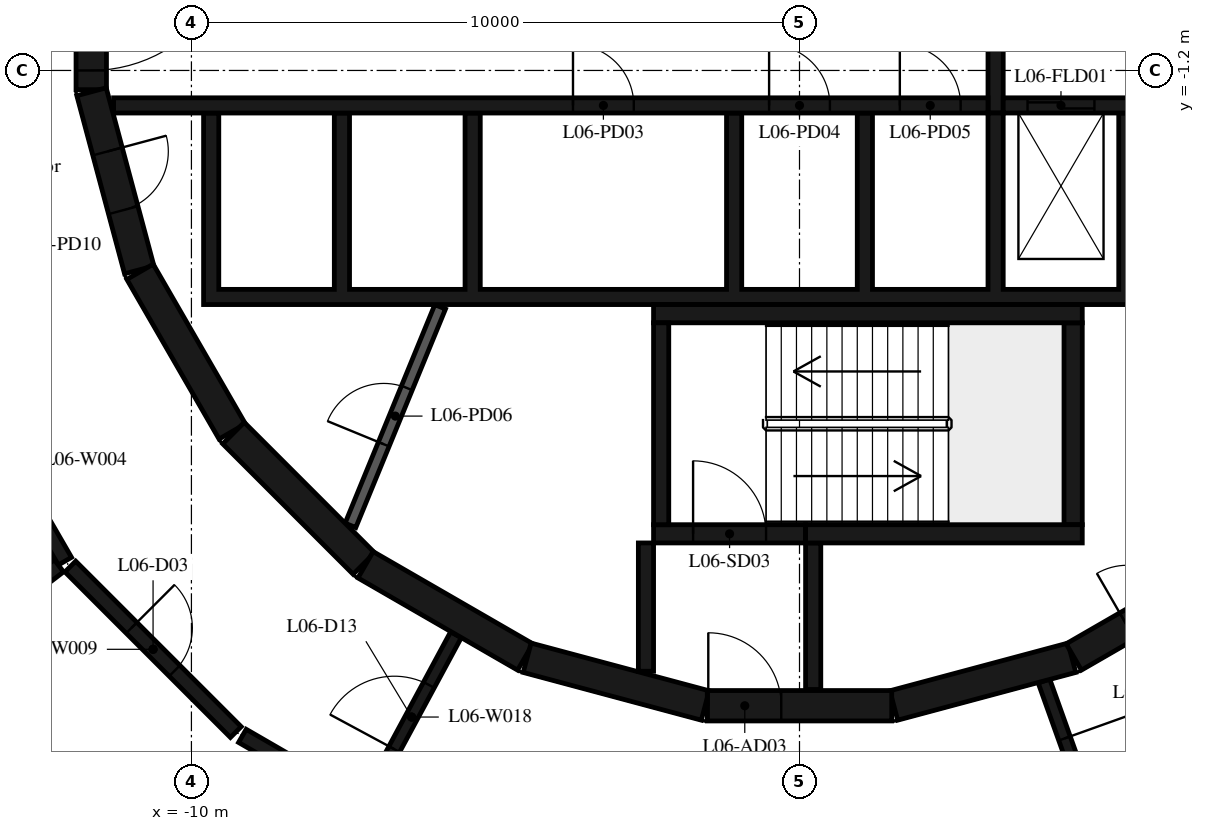
"""IFC4 building model, lengths in metres.
Left out: names, types, materials, properties, quantities, classifications, styles, units other than length and angle.
Written with IfcOpenShell. Run it as: python <this file> out.ifc"""

import sys

from ifc_helpers import new_model, si_unit, direction, frame, frame_2d, origin, place, context, subcontext, project, spatial, polyline, rectangle, outline, extrude, element, fill, save


model = new_model("IFC4")
c1 = context("Model", 3, precision=1e-05, world=origin(), true_north=direction((0.0, 1.0)))
c2 = subcontext(c1, "Body", "Model", "MODEL_VIEW")
j1 = project(units=[si_unit("LENGTHUNIT", "METRE"), si_unit("PLANEANGLEUNIT", "RADIAN")], contexts=[c1])
p1 = place(None, origin())
s1 = spatial("IfcSite", under=j1, at=p1, CompositionType="ELEMENT")
p2 = place(p1, origin())
s2 = spatial("IfcBuilding", under=s1, at=p2, CompositionType="ELEMENT")
p3 = place(p2, frame((0.0, 0.0, 33.0)))
s3 = spatial("IfcBuildingStorey", under=s2, at=p3, CompositionType="ELEMENT", Elevation=33.0)
p4 = place(p3, frame((1.55, -11.643, 0.0), z_axis=(0.0, 0.0, 1.0), x_axis=(0.965948410781, 0.258734743916, 0.0)))
e1 = element("IfcWall", 1, at=p4, inside=s3, PredefinedType="SHEAR", context=c2, shape_type="SweptSolid", body=[
    extrude(rectangle(XDim=3.033, YDim=0.5, at=frame_2d((1.516, 0.0))), origin(), (0.0, 0.0, 1.0), 4.95),
])
p5 = place(p3, frame((4.51, -10.845, 0.0), z_axis=(0.0, 0.0, 1.0), x_axis=(0.865975092491, 0.500087131594, 0.0)))
e2 = element("IfcWall", 2, at=p5, inside=s3, PredefinedType="SHEAR", context=c2, shape_type="SweptSolid", body=[
    extrude(rectangle(XDim=3.033, YDim=0.5, at=frame_2d((1.516, 0.0))), origin(), (0.0, 0.0, 1.0), 4.95),
])
p6 = place(p5, frame((1.016, 0.0, 0.0)))
e3 = element("IfcOpeningElement", 3, at=p6, cuts=e2, PredefinedType="OPENING", context=c2, shape_type="SweptSolid", body=[
    extrude(rectangle(XDim=1.0, YDim=2.4, at=frame_2d((0.5, 1.2))), frame((0.0, 0.26, 0.0), z_axis=(0.0, -1.0, 0.0), x_axis=(1.0, 0.0, 0.0)), (0.0, 0.0, 1.0), 0.52),
])
p7 = place(p3, frame((-11.647, 1.516, 0.0), z_axis=(0.0, 0.0, 1.0), x_axis=(0.0, -1.0, 0.0)))
e4 = element("IfcWall", 4, at=p7, inside=s3, PredefinedType="SHEAR", context=c2, shape_type="SweptSolid", body=[
    extrude(rectangle(XDim=3.033, YDim=0.5, at=frame_2d((1.516, 0.0))), origin(), (0.0, 0.0, 1.0), 4.95),
])
p8 = place(p7, frame((0.316, 0.0, 0.0)))
e5 = element("IfcOpeningElement", 5, at=p8, cuts=e4, PredefinedType="OPENING", context=c2, shape_type="SweptSolid", body=[
    extrude(rectangle(XDim=2.4, YDim=2.1, at=frame_2d((1.2, 1.05))), frame((0.0, 0.26, 0.0), z_axis=(0.0, -1.0, 0.0), x_axis=(1.0, 0.0, 0.0)), (0.0, 0.0, 1.0), 0.52),
])
p9 = place(p3, frame((-11.643, -1.55, 0.0), z_axis=(0.0, 0.0, 1.0), x_axis=(0.258734743916, -0.965948410781, 0.0)))
e6 = element("IfcWall", 6, at=p9, inside=s3, PredefinedType="SHEAR", context=c2, shape_type="SweptSolid", body=[
    extrude(rectangle(XDim=3.033, YDim=0.5, at=frame_2d((1.516, 0.0))), origin(), (0.0, 0.0, 1.0), 4.95),
])
p10 = place(p9, frame((1.016, 0.0, 0.0)))
e7 = element("IfcOpeningElement", 7, at=p10, cuts=e6, PredefinedType="OPENING", context=c2, shape_type="SweptSolid", body=[
    extrude(rectangle(XDim=1.0, YDim=2.4, at=frame_2d((0.5, 1.2))), frame((0.0, 0.26, 0.0), z_axis=(0.0, -1.0, 0.0), x_axis=(1.0, 0.0, 0.0)), (0.0, 0.0, 1.0), 0.52),
])
p11 = place(p3, frame((-10.845, -4.51, 0.0), z_axis=(0.0, 0.0, 1.0), x_axis=(0.500087131594, -0.865975092491, 0.0)))
e8 = element("IfcWall", 8, at=p11, inside=s3, PredefinedType="SHEAR", context=c2, shape_type="SweptSolid", body=[
    extrude(rectangle(XDim=3.033, YDim=0.5, at=frame_2d((1.516, 0.0))), origin(), (0.0, 0.0, 1.0), 4.95),
])
p12 = place(p3, frame((-9.308, -7.164, 0.0), z_axis=(0.0, 0.0, 1.0), x_axis=(0.707106781187, -0.707106781187, 0.0)))
e9 = element("IfcWall", 9, at=p12, inside=s3, PredefinedType="SHEAR", context=c2, shape_type="SweptSolid", body=[
    extrude(rectangle(XDim=3.032, YDim=0.5, at=frame_2d((1.516, 0.0))), origin(), (0.0, 0.0, 1.0), 4.95),
])
for number, where, z_axis, x_axis in (
    (10, (-7.137, -9.329, 0.0), (0.0, 0.0, 1.0), (0.866, -0.5, 0.0)),
    (11, (-4.479, -10.858, 0.0), (0.0, 0.0, 1.0), (0.966, -0.259, 0.0)),
):
    element("IfcWall", number, at=place(p3, frame(where, z_axis=z_axis, x_axis=x_axis)), inside=s3, PredefinedType="SHEAR", context=c2, shape_type="SweptSolid", body=[
        extrude(rectangle(XDim=3.033, YDim=0.5, at=frame_2d((1.516, 0.0))), origin(), (0.0, 0.0, 1.0), 4.95),
    ])
p13 = place(p3, frame((-1.516, -11.647, 0.0), z_axis=(0.0, 0.0, 1.0), x_axis=(1.0, 0.0, 0.0)))
e12 = element("IfcWall", 12, at=p13, inside=s3, PredefinedType="SHEAR", context=c2, shape_type="SweptSolid", body=[
    extrude(rectangle(XDim=3.033, YDim=0.5, at=frame_2d((1.516, 0.0))), origin(), (0.0, 0.0, 1.0), 4.95),
])
p14 = place(p13, frame((0.016, 0.0, 0.0)))
e13 = element("IfcOpeningElement", 13, at=p14, cuts=e12, PredefinedType="OPENING", context=c2, shape_type="SweptSolid", body=[
    extrude(rectangle(XDim=1.2, YDim=2.1, at=frame_2d((0.6, 1.05))), frame((0.0, 0.26, 0.0), z_axis=(0.0, -1.0, 0.0), x_axis=(1.0, 0.0, 0.0)), (0.0, 0.0, 1.0), 0.52),
])
p15 = place(p3, frame((-2.275, -8.67, 0.0), z_axis=(0.0, 0.0, 1.0), x_axis=(0.0, 1.0, 0.0)))
e14 = element("IfcWall", 14, at=p15, inside=s3, PredefinedType="SHEAR", context=c2, shape_type="SweptSolid", body=[
    extrude(rectangle(XDim=3.32, YDim=0.25, at=frame_2d((1.66, 0.0))), origin(), (0.0, 0.0, 1.0), 4.95),
])
p16 = place(p3, frame((-2.4, -5.2, 0.0), z_axis=(0.0, 0.0, 1.0), x_axis=(1.0, 0.0, 0.0)))
e15 = element("IfcWall", 15, at=p16, inside=s3, PredefinedType="SHEAR", context=c2, shape_type="SweptSolid", body=[
    extrude(rectangle(XDim=7.05, YDim=0.3, at=frame_2d((3.525, 0.0))), origin(), (0.0, 0.0, 1.0), 4.95),
])
p17 = place(p3, frame((4.5, -8.67, 0.0), z_axis=(0.0, 0.0, 1.0), x_axis=(0.0, 1.0, 0.0)))
e16 = element("IfcWall", 16, at=p17, inside=s3, PredefinedType="SHEAR", context=c2, shape_type="SweptSolid", body=[
    extrude(rectangle(XDim=3.32, YDim=0.3, at=frame_2d((1.66, 0.0))), origin(), (0.0, 0.0, 1.0), 4.95),
])
p18 = place(p3, frame((0.1, -8.82, 0.0), z_axis=(0.0, 0.0, 1.0), x_axis=(1.0, 0.0, 0.0)))
e17 = element("IfcWall", 17, at=p18, inside=s3, PredefinedType="SHEAR", context=c2, shape_type="SweptSolid", body=[
    extrude(rectangle(XDim=4.55, YDim=0.3, at=frame_2d((2.275, 0.0))), origin(), (0.0, 0.0, 1.0), 4.95),
])
p19 = place(p3, frame((-2.4, -8.82, 0.0), z_axis=(0.0, 0.0, 1.0), x_axis=(1.0, 0.0, 0.0)))
e18 = element("IfcWall", 18, at=p19, inside=s3, PredefinedType="SHEAR", context=c2, shape_type="SweptSolid", body=[
    extrude(rectangle(XDim=2.5, YDim=0.3, at=frame_2d((1.25, 0.0))), origin(), (0.0, 0.0, 1.0), 4.95),
])
p20 = place(p19, frame((0.65, 0.0, 0.0)))
e19 = element("IfcOpeningElement", 19, at=p20, cuts=e18, PredefinedType="OPENING", context=c2, shape_type="SweptSolid", body=[
    extrude(rectangle(XDim=1.2, YDim=2.1, at=frame_2d((0.6, 1.05))), frame((0.0, 0.16, 0.0), z_axis=(0.0, -1.0, 0.0), x_axis=(1.0, 0.0, 0.0)), (0.0, 0.0, 1.0), 0.32),
])
p21 = place(p3, frame((-2.525, -8.97, 0.0), z_axis=(0.0, 0.0, 1.0), x_axis=(0.0, -1.0, 0.0)))
e20 = element("IfcWall", 20, at=p21, inside=s3, PredefinedType="SHEAR", context=c2, shape_type="SweptSolid", body=[
    extrude(rectangle(XDim=2.11, YDim=0.25, at=frame_2d((1.055, 0.0))), origin(), (0.0, 0.0, 1.0), 4.95),
])
p22 = place(p3, frame((0.225, -8.97, 0.0), z_axis=(0.0, 0.0, 1.0), x_axis=(0.0, -1.0, 0.0)))
e21 = element("IfcWall", 21, at=p22, inside=s3, PredefinedType="SHEAR", context=c2, shape_type="SweptSolid", body=[
    extrude(rectangle(XDim=2.41, YDim=0.25, at=frame_2d((1.205, 0.0))), origin(), (0.0, 0.0, 1.0), 4.95),
])
p23 = place(p3, origin())
e22 = element("IfcWall", 22, at=p23, inside=s3, PredefinedType="SHEAR", context=c2, shape_type="SweptSolid", body=[
    extrude(outline(polyline([(9.8, -5.05), (9.8, -4.8), (9.8, -1.9), (9.55, -1.9), (9.55, -4.8), (7.65, -4.8), (7.65, -1.9), (7.4, -1.9), (7.4, -4.8), (5.5, -4.8), (5.5, -1.9), (5.25, -1.9), (5.25, -4.8), (3.35, -4.8), (3.35, -1.9), (3.1, -1.9), (3.1, -4.8), (1.2, -4.8), (1.2, -1.9), (0.95, -1.9), (0.95, -4.8), (-0.95, -4.8), (-0.95, -1.9), (-1.2, -1.9), (-1.2, -4.8), (-5.25, -4.8), (-5.25, -1.9), (-5.5, -1.9), (-5.5, -4.8), (-7.4, -4.8), (-7.4, -1.9), (-7.65, -1.9), (-7.65, -4.8), (-9.55, -4.8), (-9.55, -1.9), (-9.8, -1.9), (-9.8, -4.8), (-9.8, -5.05), (9.8, -5.05)])), origin(), (0.0, 0.0, 1.0), 4.95),
])
p24 = place(p3, frame((-11.28, -1.775, 0.0), z_axis=(0.0, 0.0, 1.0), x_axis=(1.0, 0.0, 0.0)))
e23 = element("IfcWall", 23, at=p24, inside=s3, PredefinedType="SHEAR", context=c2, shape_type="SweptSolid", body=[
    extrude(rectangle(XDim=14.38, YDim=0.25, at=frame_2d((7.19, 0.0))), origin(), (0.0, 0.0, 1.0), 4.95),
])
p25 = place(p24, frame((7.555, 0.0, 0.0)))
e24 = element("IfcOpeningElement", 24, at=p25, cuts=e23, PredefinedType="OPENING", context=c2, shape_type="SweptSolid", body=[
    extrude(rectangle(XDim=1.0, YDim=2.4, at=frame_2d((0.5, 1.2))), frame((0.0, 0.135, 0.0), z_axis=(0.0, -1.0, 0.0), x_axis=(1.0, 0.0, 0.0)), (0.0, 0.0, 1.0), 0.27),
])
p26 = place(p24, frame((10.78, 0.0, 0.0)))
e25 = element("IfcOpeningElement", 25, at=p26, cuts=e23, PredefinedType="OPENING", context=c2, shape_type="SweptSolid", body=[
    extrude(rectangle(XDim=1.0, YDim=2.4, at=frame_2d((0.5, 1.2))), frame((0.0, 0.135, 0.0), z_axis=(0.0, -1.0, 0.0), x_axis=(1.0, 0.0, 0.0)), (0.0, 0.0, 1.0), 0.27),
])
p27 = place(p24, frame((12.93, 0.0, 0.0)))
e26 = element("IfcOpeningElement", 26, at=p27, cuts=e23, PredefinedType="OPENING", context=c2, shape_type="SweptSolid", body=[
    extrude(rectangle(XDim=1.0, YDim=2.4, at=frame_2d((0.5, 1.2))), frame((0.0, 0.135, 0.0), z_axis=(0.0, -1.0, 0.0), x_axis=(1.0, 0.0, 0.0)), (0.0, 0.0, 1.0), 0.27),
])
p28 = place(p3, frame((3.35, -1.775, 0.0), z_axis=(0.0, 0.0, 1.0), x_axis=(1.0, 0.0, 0.0)))
e27 = element("IfcWall", 27, at=p28, inside=s3, PredefinedType="SHEAR", context=c2, shape_type="SweptSolid", body=[
    extrude(rectangle(XDim=7.93, YDim=0.25, at=frame_2d((3.965, 0.0))), origin(), (0.0, 0.0, 1.0), 4.95),
])
p29 = place(p28, frame((0.4, 0.0, 0.0)))
e28 = element("IfcOpeningElement", 28, at=p29, cuts=e27, PredefinedType="OPENING", context=c2, shape_type="SweptSolid", body=[
    extrude(rectangle(XDim=1.1, YDim=2.4, at=frame_2d((0.55, 1.2))), frame((0.0, 0.135, 0.0), z_axis=(0.0, -1.0, 0.0), x_axis=(1.0, 0.0, 0.0)), (0.0, 0.0, 1.0), 0.27),
])
p30 = place(p28, frame((2.55, 0.0, 0.0)))
e29 = element("IfcOpeningElement", 29, at=p30, cuts=e27, PredefinedType="OPENING", context=c2, shape_type="SweptSolid", body=[
    extrude(rectangle(XDim=1.1, YDim=2.4, at=frame_2d((0.55, 1.2))), frame((0.0, 0.135, 0.0), z_axis=(0.0, -1.0, 0.0), x_axis=(1.0, 0.0, 0.0)), (0.0, 0.0, 1.0), 0.27),
])
p31 = place(p28, frame((4.7, 0.0, 0.0)))
e30 = element("IfcOpeningElement", 30, at=p31, cuts=e27, PredefinedType="OPENING", context=c2, shape_type="SweptSolid", body=[
    extrude(rectangle(XDim=1.1, YDim=2.4, at=frame_2d((0.55, 1.2))), frame((0.0, 0.135, 0.0), z_axis=(0.0, -1.0, 0.0), x_axis=(1.0, 0.0, 0.0)), (0.0, 0.0, 1.0), 0.27),
])
p32 = place(p3, frame((3.225, -1.9, 0.0), z_axis=(0.0, 0.0, 1.0), x_axis=(0.0, 1.0, 0.0)))
e31 = element("IfcWall", 31, at=p32, inside=s3, PredefinedType="SHEAR", context=c2, shape_type="SweptSolid", body=[
    extrude(rectangle(XDim=3.8, YDim=0.25, at=frame_2d((1.9, 0.0))), origin(), (0.0, 0.0, 1.0), 4.95),
])
p33 = place(p3, frame((-7.385, -8.681, 0.0), z_axis=(0.0, 0.0, 1.0), x_axis=(0.379804590409, 0.925066739811, 0.0)))
e32 = element("IfcWall", 32, at=p33, inside=s3, PredefinedType="PARTITIONING", context=c2, shape_type="SweptSolid", body=[
    extrude(rectangle(XDim=3.885, YDim=0.19, at=frame_2d((1.942, 0.0))), origin(), (0.0, 0.0, 1.0), 4.95),
])
p34 = place(p33, frame((1.443, 0.0, 0.0)))
e33 = element("IfcOpeningElement", 33, at=p34, cuts=e32, PredefinedType="OPENING", context=c2, shape_type="SweptSolid", body=[
    extrude(rectangle(XDim=1.0, YDim=2.4, at=frame_2d((0.5, 1.2))), frame((0.0, 0.105, 0.0), z_axis=(0.0, -1.0, 0.0), x_axis=(1.0, 0.0, 0.0)), (0.0, 0.0, 1.0), 0.21),
])
p35 = place(p3, frame((-14.007, -5.938, 0.0), z_axis=(0.0, 0.0, 1.0), x_axis=(0.500708693508, -0.865615852585, 0.0)))
e34 = element("IfcWall", 34, at=p35, inside=s3, PredefinedType="PARTITIONING", context=c2, shape_type="SweptSolid", body=[
    extrude(rectangle(XDim=3.849, YDim=0.25, at=frame_2d((1.925, 0.0))), origin(), (0.0, 0.0, 1.0), 4.95),
])
p36 = place(p3, frame((-12.179, -9.346, 0.0), z_axis=(0.0, 0.0, 1.0), x_axis=(-0.793242531183, -0.608905811043, 0.0)))
e35 = element("IfcWall", 35, at=p36, inside=s3, PredefinedType="PARTITIONING", context=c2, shape_type="SweptSolid", body=[
    extrude(rectangle(XDim=14.986, YDim=0.25, at=frame_2d((7.493, 0.0))), origin(), (0.0, 0.0, 1.0), 4.95),
])
p37 = place(p3, frame((-11.992, -9.358, 0.0), z_axis=(0.0, 0.0, 1.0), x_axis=(0.707106781187, -0.707106781187, 0.0)))
e36 = element("IfcWall", 36, at=p37, inside=s3, PredefinedType="PARTITIONING", context=c2, shape_type="SweptSolid", body=[
    extrude(rectangle(XDim=3.849, YDim=0.25, at=frame_2d((1.925, 0.0))), origin(), (0.0, 0.0, 1.0), 4.95),
])
p38 = place(p37, frame((1.425, 0.0, 0.0)))
e37 = element("IfcOpeningElement", 37, at=p38, cuts=e36, PredefinedType="OPENING", context=c2, shape_type="SweptSolid", body=[
    extrude(rectangle(XDim=1.0, YDim=2.1, at=frame_2d((0.5, 1.05))), frame((0.0, 0.135, 0.0), z_axis=(0.0, -1.0, 0.0), x_axis=(1.0, 0.0, 0.0)), (0.0, 0.0, 1.0), 0.27),
])
p39 = place(p3, frame((-9.162, -12.143, 0.0), z_axis=(0.0, 0.0, 1.0), x_axis=(0.865576208327, -0.500777223502, 0.0)))
e38 = element("IfcWall", 38, at=p39, inside=s3, PredefinedType="PARTITIONING", context=c2, shape_type="SweptSolid", body=[
    extrude(rectangle(XDim=2.303, YDim=0.25, at=frame_2d((1.152, 0.0))), origin(), (0.0, 0.0, 1.0), 4.95),
])
p40 = place(p3, frame((-7.109, -13.186, 0.0), z_axis=(0.0, 0.0, 1.0), x_axis=(0.474511788195, 0.880249148176, 0.0)))
e39 = element("IfcWall", 39, at=p40, inside=s3, PredefinedType="PARTITIONING", context=c2, shape_type="SweptSolid", body=[
    extrude(rectangle(XDim=3.074, YDim=0.2, at=frame_2d((1.537, 0.0))), origin(), (0.0, 0.0, 1.0), 4.95),
])
p41 = place(p40, frame((0.937, 0.0, 0.0)))
e40 = element("IfcOpeningElement", 40, at=p41, cuts=e39, PredefinedType="OPENING", context=c2, shape_type="SweptSolid", body=[
    extrude(rectangle(XDim=1.2, YDim=2.1, at=frame_2d((0.6, 1.05))), frame((0.0, 0.11, 0.0), z_axis=(0.0, -1.0, 0.0), x_axis=(1.0, 0.0, 0.0)), (0.0, 0.0, 1.0), 0.22),
])
p42 = place(p3, frame((4.02, -11.24, 0.0), z_axis=(0.0, 0.0, 1.0), x_axis=(0.336751058688, -0.941593715183, 0.0)))
e41 = element("IfcWall", 41, at=p42, inside=s3, PredefinedType="PARTITIONING", context=c2, shape_type="SweptSolid", body=[
    extrude(rectangle(XDim=3.207, YDim=0.2, at=frame_2d((1.604, 0.0))), origin(), (0.0, 0.0, 1.0), 4.95),
])
p43 = place(p42, frame((1.004, 0.0, 0.0)))
e42 = element("IfcOpeningElement", 42, at=p43, cuts=e41, PredefinedType="OPENING", context=c2, shape_type="SweptSolid", body=[
    extrude(rectangle(XDim=1.2, YDim=2.1, at=frame_2d((0.6, 1.05))), frame((0.0, 0.11, 0.0), z_axis=(0.0, -1.0, 0.0), x_axis=(1.0, 0.0, 0.0)), (0.0, 0.0, 1.0), 0.22),
])
p44 = place(p20, origin())
e43 = element("IfcDoor", 43, at=p44, inside=s3, OperationType="SINGLE_SWING_LEFT", PredefinedType="DOOR", context=c2, shape_type="SweptSolid", body=[
    extrude(rectangle(XDim=1.2, YDim=2.1, at=frame_2d((0.6, 1.05))), frame((0.0, 0.025, 0.0), z_axis=(0.0, -1.0, 0.0), x_axis=(1.0, 0.0, 0.0)), (0.0, 0.0, 1.0), 0.05),
])
fill(e19, e43)
p45 = place(p14, origin())
e44 = element("IfcDoor", 44, at=p45, inside=s3, OperationType="SINGLE_SWING_RIGHT", PredefinedType="DOOR", context=c2, shape_type="SweptSolid", body=[
    extrude(rectangle(XDim=1.2, YDim=2.1, at=frame_2d((0.6, 1.05))), frame((0.0, 0.025, 0.0), z_axis=(0.0, -1.0, 0.0), x_axis=(1.0, 0.0, 0.0)), (0.0, 0.0, 1.0), 0.05),
])
fill(e13, e44)
p46 = place(p8, origin())
e45 = element("IfcDoor", 45, at=p46, inside=s3, OperationType="DOUBLE_DOOR_SINGLE_SWING", PredefinedType="DOOR", context=c2, shape_type="SweptSolid", body=[
    extrude(rectangle(XDim=2.4, YDim=2.1, at=frame_2d((1.2, 1.05))), frame((0.0, 0.025, 0.0), z_axis=(0.0, -1.0, 0.0), x_axis=(1.0, 0.0, 0.0)), (0.0, 0.0, 1.0), 0.05),
])
fill(e5, e45)
p47 = place(p29, origin())
e46 = element("IfcDoor", 46, at=p47, inside=s3, OperationType="DOUBLE_DOOR_SLIDING", PredefinedType="DOOR", context=c2, shape_type="SweptSolid", body=[
    extrude(rectangle(XDim=1.1, YDim=2.4, at=frame_2d((0.55, 1.2))), frame((0.0, 0.025, 0.0), z_axis=(0.0, -1.0, 0.0), x_axis=(1.0, 0.0, 0.0)), (0.0, 0.0, 1.0), 0.05),
])
fill(e28, e46)
p48 = place(p25, origin())
e47 = element("IfcDoor", 47, at=p48, inside=s3, OperationType="SINGLE_SWING_RIGHT", PredefinedType="DOOR", context=c2, shape_type="SweptSolid", body=[
    extrude(rectangle(XDim=1.0, YDim=2.4, at=frame_2d((0.5, 1.2))), frame((0.0, 0.025, 0.0), z_axis=(0.0, -1.0, 0.0), x_axis=(1.0, 0.0, 0.0)), (0.0, 0.0, 1.0), 0.05),
])
fill(e24, e47)
p49 = place(p26, origin())
e48 = element("IfcDoor", 48, at=p49, inside=s3, OperationType="SINGLE_SWING_LEFT", PredefinedType="DOOR", context=c2, shape_type="SweptSolid", body=[
    extrude(rectangle(XDim=1.0, YDim=2.4, at=frame_2d((0.5, 1.2))), frame((0.0, 0.025, 0.0), z_axis=(0.0, -1.0, 0.0), x_axis=(1.0, 0.0, 0.0)), (0.0, 0.0, 1.0), 0.05),
])
fill(e25, e48)
p50 = place(p27, origin())
e49 = element("IfcDoor", 49, at=p50, inside=s3, OperationType="SINGLE_SWING_RIGHT", PredefinedType="DOOR", context=c2, shape_type="SweptSolid", body=[
    extrude(rectangle(XDim=1.0, YDim=2.4, at=frame_2d((0.5, 1.2))), frame((0.0, 0.025, 0.0), z_axis=(0.0, -1.0, 0.0), x_axis=(1.0, 0.0, 0.0)), (0.0, 0.0, 1.0), 0.05),
])
fill(e26, e49)
p51 = place(p34, origin())
e50 = element("IfcDoor", 50, at=p51, inside=s3, OperationType="SINGLE_SWING_LEFT", PredefinedType="DOOR", context=c2, shape_type="SweptSolid", body=[
    extrude(rectangle(XDim=1.0, YDim=2.4, at=frame_2d((0.5, 1.2))), frame((0.0, 0.025, 0.0), z_axis=(0.0, -1.0, 0.0), x_axis=(1.0, 0.0, 0.0)), (0.0, 0.0, 1.0), 0.05),
])
fill(e33, e50)
p52 = place(p10, origin())
e51 = element("IfcDoor", 51, at=p52, inside=s3, OperationType="SINGLE_SWING_LEFT", PredefinedType="DOOR", context=c2, shape_type="SweptSolid", body=[
    extrude(rectangle(XDim=1.0, YDim=2.4, at=frame_2d((0.5, 1.2))), frame((0.0, 0.025, 0.0), z_axis=(0.0, -1.0, 0.0), x_axis=(1.0, 0.0, 0.0)), (0.0, 0.0, 1.0), 0.05),
])
fill(e7, e51)
p53 = place(p38, origin())
e52 = element("IfcDoor", 52, at=p53, inside=s3, OperationType="SINGLE_SWING_LEFT", PredefinedType="DOOR", context=c2, shape_type="SweptSolid", body=[
    extrude(rectangle(XDim=1.0, YDim=2.1, at=frame_2d((0.5, 1.05))), frame((0.0, 0.025, 0.0), z_axis=(0.0, -1.0, 0.0), x_axis=(1.0, 0.0, 0.0)), (0.0, 0.0, 1.0), 0.05),
])
fill(e37, e52)
p54 = place(p43, origin())
e53 = element("IfcDoor", 53, at=p54, inside=s3, OperationType="SINGLE_SWING_LEFT", PredefinedType="DOOR", context=c2, shape_type="SweptSolid", body=[
    extrude(rectangle(XDim=1.2, YDim=2.1, at=frame_2d((0.6, 1.05))), frame((0.0, 0.025, 0.0), z_axis=(0.0, -1.0, 0.0), x_axis=(1.0, 0.0, 0.0)), (0.0, 0.0, 1.0), 0.05),
])
fill(e42, e53)
p55 = place(p41, origin())
e54 = element("IfcDoor", 54, at=p55, inside=s3, OperationType="SINGLE_SWING_LEFT", PredefinedType="DOOR", context=c2, shape_type="SweptSolid", body=[
    extrude(rectangle(XDim=1.2, YDim=2.1, at=frame_2d((0.6, 1.05))), frame((0.0, 0.025, 0.0), z_axis=(0.0, -1.0, 0.0), x_axis=(1.0, 0.0, 0.0)), (0.0, 0.0, 1.0), 0.05),
])
fill(e40, e54)
save(model, sys.argv[1])
